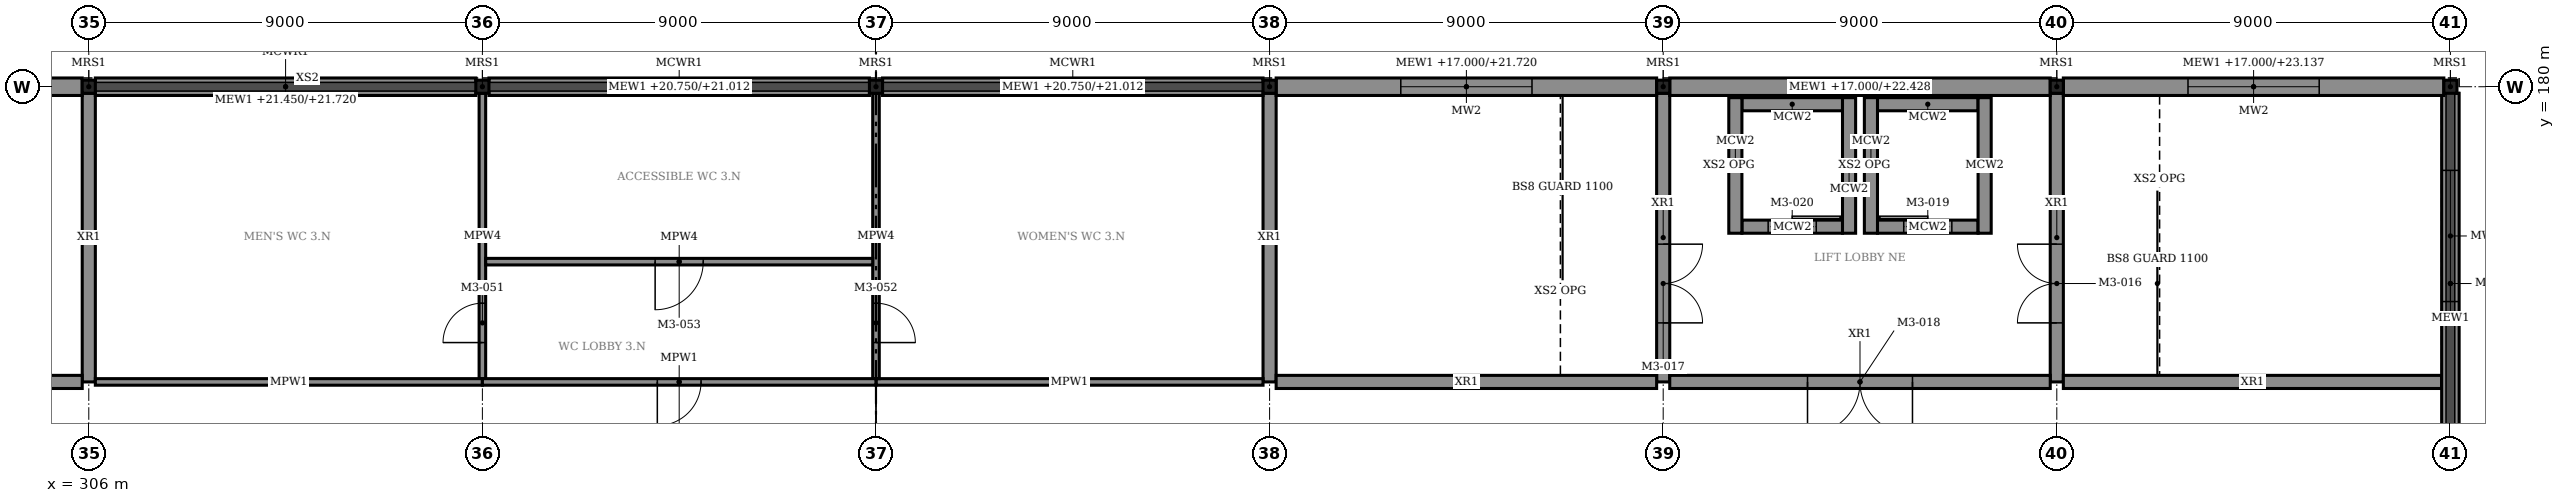
"""IFC4 building model, lengths in metres.
Left out: names, types, materials, properties, quantities, classifications, styles, units other than length and angle.
Written with IfcOpenShell. Run it as: python <this file> out.ifc"""

import sys

from ifc_helpers import new_model, si_unit, direction, frame, frame_2d, origin, origin_2d, place, context, subcontext, project, spatial, polyline, rectangle, hollow_rectangle, outline, extrude, element, fill, save


model = new_model("IFC4")
c1 = context("Model", 3, precision=1e-05, world=origin(), true_north=direction((0.0, 1.0)))
c2 = subcontext(c1, "Body", "Model", "MODEL_VIEW")
j1 = project(units=[si_unit("LENGTHUNIT", "METRE"), si_unit("PLANEANGLEUNIT", "RADIAN")], contexts=[c1])
p1 = place(None, origin())
s1 = spatial("IfcSite", under=j1, at=p1, CompositionType="ELEMENT")
p2 = place(p1, origin())
s2 = spatial("IfcBuilding", under=s1, at=p2, CompositionType="ELEMENT")
p3 = place(p2, frame((0.0, 0.0, 17.0)))
s3 = spatial("IfcBuildingStorey", under=s2, at=p3, CompositionType="ELEMENT", Elevation=17.0)
for number, where, z_axis, x_axis in (
    (1, (306.0, 180.0, 0.0), (0.0, 0.0, 1.0), (1.0, 0.0, 0.0)),
    (2, (315.0, 180.0, 0.0), (0.0, 0.0, 1.0), (1.0, 0.0, 0.0)),
    (3, (324.0, 180.0, 0.0), (0.0, 0.0, 1.0), (1.0, 0.0, 0.0)),
    (4, (333.0, 180.0, 0.0), (0.0, 0.0, 1.0), (1.0, 0.0, 0.0)),
    (5, (342.0, 180.0, 0.0), (0.0, 0.0, 1.0), (1.0, 0.0, 0.0)),
    (6, (351.0, 180.0, 0.0), (0.0, 0.0, 1.0), (1.0, 0.0, 0.0)),
    (7, (360.0, 180.0, 0.0), (0.0, 0.0, 1.0), (1.0, 0.0, 0.0)),
):
    element("IfcColumn", number, at=place(p3, frame(where, z_axis=z_axis, x_axis=x_axis)), inside=s3, PredefinedType="COLUMN", context=c2, shape_type="SweptSolid", body=[
        extrude(hollow_rectangle(XDim=0.3, YDim=0.3, WallThickness=0.012, InnerFilletRadius=0.024, OuterFilletRadius=0.036, at=origin_2d()), origin(), (0.0, 0.0, 1.0), 3.1),
    ])
p4 = place(p3, frame((297.15, 180.0, 0.0), z_axis=(0.0, 0.0, 1.0), x_axis=(1.0, 0.0, 0.0)))
e8 = element("IfcWall", 8, at=p4, inside=s3, PredefinedType="STANDARD", context=c2, shape_type="SweptSolid", body=[
    extrude(outline(polyline([(0.0, 0.0), (8.7, 0.0), (8.7, 5.428), (0.0, 6.113), (0.0, 0.0)])), frame((0.0, 0.2, 0.0), z_axis=(0.0, -1.0, 0.0), x_axis=(1.0, 0.0, 0.0)), (0.0, 0.0, 1.0), 0.4),
])
p5 = place(p4, frame((2.85, 0.0, 0.9)))
e9 = element("IfcOpeningElement", 9, at=p5, cuts=e8, PredefinedType="OPENING", context=c2, shape_type="SweptSolid", body=[
    extrude(rectangle(XDim=3.0, YDim=2.1, at=frame_2d((1.5, 1.05))), frame((0.0, 0.21, 0.0), z_axis=(0.0, -1.0, 0.0), x_axis=(1.0, 0.0, 0.0)), (0.0, 0.0, 1.0), 0.42),
])
p6 = place(p3, frame((306.15, 180.0, 4.45), z_axis=(0.0, 0.0, 1.0), x_axis=(1.0, 0.0, 0.0)))
e10 = element("IfcWall", 10, at=p6, inside=s3, PredefinedType="STANDARD", context=c2, shape_type="SweptSolid", body=[
    extrude(outline(polyline([(0.0, 0.0), (8.7, 0.0), (8.7, 0.27), (0.0, 0.955), (0.0, 0.0)])), frame((0.0, 0.2, 0.0), z_axis=(0.0, -1.0, 0.0), x_axis=(1.0, 0.0, 0.0)), (0.0, 0.0, 1.0), 0.4),
])
p7 = place(p3, frame((315.15, 180.0, 3.75), z_axis=(0.0, 0.0, 1.0), x_axis=(1.0, 0.0, 0.0)))
e11 = element("IfcWall", 11, at=p7, inside=s3, PredefinedType="STANDARD", context=c2, shape_type="SweptSolid", body=[
    extrude(outline(polyline([(0.0, 0.0), (8.7, 0.0), (8.7, 0.262), (0.0, 0.947), (0.0, 0.0)])), frame((0.0, 0.2, 0.0), z_axis=(0.0, -1.0, 0.0), x_axis=(1.0, 0.0, 0.0)), (0.0, 0.0, 1.0), 0.4),
])
p8 = place(p3, frame((324.15, 180.0, 3.75), z_axis=(0.0, 0.0, 1.0), x_axis=(1.0, 0.0, 0.0)))
e12 = element("IfcWall", 12, at=p8, inside=s3, PredefinedType="STANDARD", context=c2, shape_type="SweptSolid", body=[
    extrude(outline(polyline([(0.0, 0.0), (8.7, 0.0), (8.7, 0.947), (0.0, 0.262), (0.0, 0.0)])), frame((0.0, 0.2, 0.0), z_axis=(0.0, -1.0, 0.0), x_axis=(1.0, 0.0, 0.0)), (0.0, 0.0, 1.0), 0.4),
])
p9 = place(p3, frame((333.15, 180.0, 0.0), z_axis=(0.0, 0.0, 1.0), x_axis=(1.0, 0.0, 0.0)))
e13 = element("IfcWall", 13, at=p9, inside=s3, PredefinedType="STANDARD", context=c2, shape_type="SweptSolid", body=[
    extrude(outline(polyline([(0.0, 0.0), (8.7, 0.0), (8.7, 5.405), (0.0, 4.72), (0.0, 0.0)])), frame((0.0, 0.2, 0.0), z_axis=(0.0, -1.0, 0.0), x_axis=(1.0, 0.0, 0.0)), (0.0, 0.0, 1.0), 0.4),
])
p10 = place(p9, frame((2.85, 0.0, 0.9)))
e14 = element("IfcOpeningElement", 14, at=p10, cuts=e13, PredefinedType="OPENING", context=c2, shape_type="SweptSolid", body=[
    extrude(rectangle(XDim=3.0, YDim=2.1, at=frame_2d((1.5, 1.05))), frame((0.0, 0.21, 0.0), z_axis=(0.0, -1.0, 0.0), x_axis=(1.0, 0.0, 0.0)), (0.0, 0.0, 1.0), 0.42),
])
p11 = place(p3, frame((342.15, 180.0, 0.0), z_axis=(0.0, 0.0, 1.0), x_axis=(1.0, 0.0, 0.0)))
e15 = element("IfcWall", 15, at=p11, inside=s3, PredefinedType="STANDARD", context=c2, shape_type="SweptSolid", body=[
    extrude(outline(polyline([(0.0, 0.0), (8.7, 0.0), (8.7, 6.113), (0.0, 5.428), (0.0, 0.0)])), frame((0.0, 0.2, 0.0), z_axis=(0.0, -1.0, 0.0), x_axis=(1.0, 0.0, 0.0)), (0.0, 0.0, 1.0), 0.4),
])
p12 = place(p3, frame((351.15, 180.0, 0.0), z_axis=(0.0, 0.0, 1.0), x_axis=(1.0, 0.0, 0.0)))
e16 = element("IfcWall", 16, at=p12, inside=s3, PredefinedType="STANDARD", context=c2, shape_type="SweptSolid", body=[
    extrude(outline(polyline([(0.0, 0.0), (8.7, 0.0), (8.7, 6.822), (0.0, 6.137), (0.0, 0.0)])), frame((0.0, 0.2, 0.0), z_axis=(0.0, -1.0, 0.0), x_axis=(1.0, 0.0, 0.0)), (0.0, 0.0, 1.0), 0.4),
])
p13 = place(p12, frame((2.85, 0.0, 0.9)))
e17 = element("IfcOpeningElement", 17, at=p13, cuts=e16, PredefinedType="OPENING", context=c2, shape_type="SweptSolid", body=[
    extrude(rectangle(XDim=3.0, YDim=2.1, at=frame_2d((1.5, 1.05))), frame((0.0, 0.21, 0.0), z_axis=(0.0, -1.0, 0.0), x_axis=(1.0, 0.0, 0.0)), (0.0, 0.0, 1.0), 0.42),
])
p14 = place(p3, frame((360.0, 171.15, 0.0), z_axis=(0.0, 0.0, 1.0), x_axis=(0.0, 1.0, 0.0)))
e18 = element("IfcWall", 18, at=p14, inside=s3, PredefinedType="STANDARD", context=c2, shape_type="SweptSolid", body=[
    extrude(rectangle(XDim=8.7, YDim=0.4, at=frame_2d((4.35, 0.0))), origin(), (0.0, 0.0, 1.0), 3.3),
])
p15 = place(p14, frame((3.938, 0.0, 0.9)))
e19 = element("IfcOpeningElement", 19, at=p15, cuts=e18, PredefinedType="OPENING", context=c2, shape_type="SweptSolid", body=[
    extrude(rectangle(XDim=3.0, YDim=2.1, at=frame_2d((1.5, 1.05))), frame((0.0, 0.21, 0.0), z_axis=(0.0, -1.0, 0.0), x_axis=(1.0, 0.0, 0.0)), (0.0, 0.0, 1.0), 0.42),
])
p16 = place(p3, frame((306.0, 173.25, 0.0), z_axis=(0.0, 0.0, 1.0), x_axis=(0.0, 1.0, 0.0)))
e20 = element("IfcWall", 20, at=p16, inside=s3, PredefinedType="SHEAR", context=c2, shape_type="SweptSolid", body=[
    extrude(rectangle(XDim=6.6, YDim=0.3, at=frame_2d((3.3, 0.0))), origin(), (0.0, 0.0, 1.0), 3.0),
])
p17 = place(p3, frame((297.15, 173.25, 0.0), z_axis=(0.0, 0.0, 1.0), x_axis=(1.0, 0.0, 0.0)))
e21 = element("IfcWall", 21, at=p17, inside=s3, PredefinedType="SHEAR", context=c2, shape_type="SweptSolid", body=[
    extrude(rectangle(XDim=8.7, YDim=0.3, at=frame_2d((4.35, 0.0))), origin(), (0.0, 0.0, 1.0), 3.0),
])
p18 = place(p3, frame((351.0, 173.25, 0.0), z_axis=(0.0, 0.0, 1.0), x_axis=(0.0, 1.0, 0.0)))
e22 = element("IfcWall", 22, at=p18, inside=s3, PredefinedType="SHEAR", context=c2, shape_type="SweptSolid", body=[
    extrude(rectangle(XDim=6.6, YDim=0.3, at=frame_2d((3.3, 0.0))), origin(), (0.0, 0.0, 1.0), 3.0),
])
p19 = place(p18, frame((1.35, 0.0, 0.0)))
e23 = element("IfcOpeningElement", 23, at=p19, cuts=e22, PredefinedType="OPENING", context=c2, shape_type="SweptSolid", body=[
    extrude(rectangle(XDim=1.8, YDim=2.4, at=frame_2d((0.9, 1.2))), frame((0.0, 0.16, 0.0), z_axis=(0.0, -1.0, 0.0), x_axis=(1.0, 0.0, 0.0)), (0.0, 0.0, 1.0), 0.32),
])
p20 = place(p3, frame((342.0, 173.25, 0.0), z_axis=(0.0, 0.0, 1.0), x_axis=(0.0, 1.0, 0.0)))
e24 = element("IfcWall", 24, at=p20, inside=s3, PredefinedType="SHEAR", context=c2, shape_type="SweptSolid", body=[
    extrude(rectangle(XDim=6.6, YDim=0.3, at=frame_2d((3.3, 0.0))), origin(), (0.0, 0.0, 1.0), 3.0),
])
p21 = place(p20, frame((1.35, 0.0, 0.0)))
e25 = element("IfcOpeningElement", 25, at=p21, cuts=e24, PredefinedType="OPENING", context=c2, shape_type="SweptSolid", body=[
    extrude(rectangle(XDim=1.8, YDim=2.4, at=frame_2d((0.9, 1.2))), frame((0.0, 0.16, 0.0), z_axis=(0.0, -1.0, 0.0), x_axis=(1.0, 0.0, 0.0)), (0.0, 0.0, 1.0), 0.32),
])
p22 = place(p3, frame((333.0, 173.25, 0.0), z_axis=(0.0, 0.0, 1.0), x_axis=(0.0, 1.0, 0.0)))
e26 = element("IfcWall", 26, at=p22, inside=s3, PredefinedType="SHEAR", context=c2, shape_type="SweptSolid", body=[
    extrude(rectangle(XDim=6.6, YDim=0.3, at=frame_2d((3.3, 0.0))), origin(), (0.0, 0.0, 1.0), 3.0),
])
p23 = place(p3, frame((333.15, 173.25, 0.0), z_axis=(0.0, 0.0, 1.0), x_axis=(1.0, 0.0, 0.0)))
e27 = element("IfcWall", 27, at=p23, inside=s3, PredefinedType="SHEAR", context=c2, shape_type="SweptSolid", body=[
    extrude(rectangle(XDim=8.7, YDim=0.3, at=frame_2d((4.35, 0.0))), origin(), (0.0, 0.0, 1.0), 3.0),
])
p24 = place(p3, frame((342.15, 173.25, 0.0), z_axis=(0.0, 0.0, 1.0), x_axis=(1.0, 0.0, 0.0)))
e28 = element("IfcWall", 28, at=p24, inside=s3, PredefinedType="SHEAR", context=c2, shape_type="SweptSolid", body=[
    extrude(rectangle(XDim=8.7, YDim=0.3, at=frame_2d((4.35, 0.0))), origin(), (0.0, 0.0, 1.0), 3.0),
])
p25 = place(p24, frame((3.15, 0.0, 0.0)))
e29 = element("IfcOpeningElement", 29, at=p25, cuts=e28, PredefinedType="OPENING", context=c2, shape_type="SweptSolid", body=[
    extrude(rectangle(XDim=2.4, YDim=2.4, at=frame_2d((1.2, 1.2))), frame((0.0, 0.16, 0.0), z_axis=(0.0, -1.0, 0.0), x_axis=(1.0, 0.0, 0.0)), (0.0, 0.0, 1.0), 0.32),
])
p26 = place(p3, frame((351.15, 173.25, 0.0), z_axis=(0.0, 0.0, 1.0), x_axis=(1.0, 0.0, 0.0)))
e30 = element("IfcWall", 30, at=p26, inside=s3, PredefinedType="SHEAR", context=c2, shape_type="SweptSolid", body=[
    extrude(rectangle(XDim=8.65, YDim=0.3, at=frame_2d((4.325, 0.0))), origin(), (0.0, 0.0, 1.0), 3.0),
])
for number, where, z_axis, x_axis in (
    (31, (349.35, 176.65, 0.0), (0.0, 0.0, 1.0), (0.0, 1.0, 0.0)),
    (32, (346.75, 176.65, 0.0), (0.0, 0.0, 1.0), (0.0, 1.0, 0.0)),
):
    element("IfcWall", number, at=place(p3, frame(where, z_axis=z_axis, x_axis=x_axis)), inside=s3, PredefinedType="SHEAR", context=c2, shape_type="SweptSolid", body=[
        extrude(rectangle(XDim=3.1, YDim=0.3, at=frame_2d((1.55, 0.0))), origin(), (0.0, 0.0, 1.0), 3.0),
    ])
p27 = place(p3, frame((346.9, 179.6, 0.0), z_axis=(0.0, 0.0, 1.0), x_axis=(1.0, 0.0, 0.0)))
e33 = element("IfcWall", 33, at=p27, inside=s3, PredefinedType="SHEAR", context=c2, shape_type="SweptSolid", body=[
    extrude(rectangle(XDim=2.3, YDim=0.3, at=frame_2d((1.15, 0.0))), origin(), (0.0, 0.0, 1.0), 3.0),
])
p28 = place(p3, frame((346.9, 176.8, 0.0), z_axis=(0.0, 0.0, 1.0), x_axis=(1.0, 0.0, 0.0)))
e34 = element("IfcWall", 34, at=p28, inside=s3, PredefinedType="SHEAR", context=c2, shape_type="SweptSolid", body=[
    extrude(rectangle(XDim=2.3, YDim=0.3, at=frame_2d((1.15, 0.0))), origin(), (0.0, 0.0, 1.0), 3.0),
])
p29 = place(p28, frame((0.6, 0.0, 0.0)))
e35 = element("IfcOpeningElement", 35, at=p29, cuts=e34, PredefinedType="OPENING", context=c2, shape_type="SweptSolid", body=[
    extrude(rectangle(XDim=1.1, YDim=2.2, at=frame_2d((0.55, 1.1))), frame((0.0, 0.16, 0.0), z_axis=(0.0, -1.0, 0.0), x_axis=(1.0, 0.0, 0.0)), (0.0, 0.0, 1.0), 0.32),
])
for number, where, z_axis, x_axis in (
    (36, (346.25, 176.65, 0.0), (0.0, 0.0, 1.0), (0.0, 1.0, 0.0)),
    (37, (343.65, 176.65, 0.0), (0.0, 0.0, 1.0), (0.0, 1.0, 0.0)),
):
    element("IfcWall", number, at=place(p3, frame(where, z_axis=z_axis, x_axis=x_axis)), inside=s3, PredefinedType="SHEAR", context=c2, shape_type="SweptSolid", body=[
        extrude(rectangle(XDim=3.1, YDim=0.3, at=frame_2d((1.55, 0.0))), origin(), (0.0, 0.0, 1.0), 3.0),
    ])
p30 = place(p3, frame((343.8, 179.6, 0.0), z_axis=(0.0, 0.0, 1.0), x_axis=(1.0, 0.0, 0.0)))
e38 = element("IfcWall", 38, at=p30, inside=s3, PredefinedType="SHEAR", context=c2, shape_type="SweptSolid", body=[
    extrude(rectangle(XDim=2.3, YDim=0.3, at=frame_2d((1.15, 0.0))), origin(), (0.0, 0.0, 1.0), 3.0),
])
p31 = place(p3, frame((343.8, 176.8, 0.0), z_axis=(0.0, 0.0, 1.0), x_axis=(1.0, 0.0, 0.0)))
e39 = element("IfcWall", 39, at=p31, inside=s3, PredefinedType="SHEAR", context=c2, shape_type="SweptSolid", body=[
    extrude(rectangle(XDim=2.3, YDim=0.3, at=frame_2d((1.15, 0.0))), origin(), (0.0, 0.0, 1.0), 3.0),
])
p32 = place(p31, frame((0.6, 0.0, 0.0)))
e40 = element("IfcOpeningElement", 40, at=p32, cuts=e39, PredefinedType="OPENING", context=c2, shape_type="SweptSolid", body=[
    extrude(rectangle(XDim=1.1, YDim=2.2, at=frame_2d((0.55, 1.1))), frame((0.0, 0.16, 0.0), z_axis=(0.0, -1.0, 0.0), x_axis=(1.0, 0.0, 0.0)), (0.0, 0.0, 1.0), 0.32),
])
p33 = place(p3, frame((306.15, 173.25, 0.0), z_axis=(0.0, 0.0, 1.0), x_axis=(1.0, 0.0, 0.0)))
e41 = element("IfcWall", 41, at=p33, inside=s3, PredefinedType="PARTITIONING", context=c2, shape_type="SweptSolid", body=[
    extrude(rectangle(XDim=8.85, YDim=0.15, at=frame_2d((4.425, 0.0))), origin(), (0.0, 0.0, 1.0), 3.0),
])
p34 = place(p3, frame((315.0, 173.325, 0.0), z_axis=(0.0, 0.0, 1.0), x_axis=(0.0, 1.0, 0.0)))
e42 = element("IfcWall", 42, at=p34, inside=s3, PredefinedType="PARTITIONING", context=c2, shape_type="SweptSolid", body=[
    extrude(rectangle(XDim=6.525, YDim=0.15, at=frame_2d((3.263, 0.0))), origin(), (0.0, 0.0, 1.0), 3.0),
])
p35 = place(p34, frame((0.825, 0.0, 0.0)))
e43 = element("IfcOpeningElement", 43, at=p35, cuts=e42, PredefinedType="OPENING", context=c2, shape_type="SweptSolid", body=[
    extrude(rectangle(XDim=0.9, YDim=2.1, at=frame_2d((0.45, 1.05))), frame((0.0, 0.085, 0.0), z_axis=(0.0, -1.0, 0.0), x_axis=(1.0, 0.0, 0.0)), (0.0, 0.0, 1.0), 0.17),
])
p36 = place(p3, frame((324.0, 173.25, 0.0), z_axis=(0.0, 0.0, 1.0), x_axis=(1.0, 0.0, 0.0)))
e44 = element("IfcWall", 44, at=p36, inside=s3, PredefinedType="PARTITIONING", context=c2, shape_type="SweptSolid", body=[
    extrude(rectangle(XDim=8.85, YDim=0.15, at=frame_2d((4.425, 0.0))), origin(), (0.0, 0.0, 1.0), 3.0),
])
p37 = place(p3, frame((324.0, 173.325, 0.0), z_axis=(0.0, 0.0, 1.0), x_axis=(0.0, 1.0, 0.0)))
e45 = element("IfcWall", 45, at=p37, inside=s3, PredefinedType="PARTITIONING", context=c2, shape_type="SweptSolid", body=[
    extrude(rectangle(XDim=6.525, YDim=0.15, at=frame_2d((3.263, 0.0))), origin(), (0.0, 0.0, 1.0), 3.0),
])
p38 = place(p37, frame((0.825, 0.0, 0.0)))
e46 = element("IfcOpeningElement", 46, at=p38, cuts=e45, PredefinedType="OPENING", context=c2, shape_type="SweptSolid", body=[
    extrude(rectangle(XDim=0.9, YDim=2.1, at=frame_2d((0.45, 1.05))), frame((0.0, 0.085, 0.0), z_axis=(0.0, -1.0, 0.0), x_axis=(1.0, 0.0, 0.0)), (0.0, 0.0, 1.0), 0.17),
])
p39 = place(p3, frame((315.075, 176.0, 0.0), z_axis=(0.0, 0.0, 1.0), x_axis=(1.0, 0.0, 0.0)))
e47 = element("IfcWall", 47, at=p39, inside=s3, PredefinedType="PARTITIONING", context=c2, shape_type="SweptSolid", body=[
    extrude(rectangle(XDim=8.85, YDim=0.15, at=frame_2d((4.425, 0.0))), origin(), (0.0, 0.0, 1.0), 3.0),
])
p40 = place(p39, frame((3.875, 0.0, 0.0)))
e48 = element("IfcOpeningElement", 48, at=p40, cuts=e47, PredefinedType="OPENING", context=c2, shape_type="SweptSolid", body=[
    extrude(rectangle(XDim=1.1, YDim=2.1, at=frame_2d((0.55, 1.05))), frame((0.0, 0.085, 0.0), z_axis=(0.0, -1.0, 0.0), x_axis=(1.0, 0.0, 0.0)), (0.0, 0.0, 1.0), 0.17),
])
p41 = place(p3, frame((315.0, 173.25, 0.0), z_axis=(0.0, 0.0, 1.0), x_axis=(1.0, 0.0, 0.0)))
e49 = element("IfcWall", 49, at=p41, inside=s3, PredefinedType="PARTITIONING", context=c2, shape_type="SweptSolid", body=[
    extrude(rectangle(XDim=9.0, YDim=0.15, at=frame_2d((4.5, 0.0))), origin(), (0.0, 0.0, 1.0), 3.0),
])
p42 = place(p41, frame((4.0, 0.0, 0.0)))
e50 = element("IfcOpeningElement", 50, at=p42, cuts=e49, PredefinedType="OPENING", context=c2, shape_type="SweptSolid", body=[
    extrude(rectangle(XDim=1.0, YDim=2.4, at=frame_2d((0.5, 1.2))), frame((0.0, 0.085, 0.0), z_axis=(0.0, -1.0, 0.0), x_axis=(1.0, 0.0, 0.0)), (0.0, 0.0, 1.0), 0.17),
])
p43 = place(p10, origin())
e51 = element("IfcWindow", 51, at=p43, inside=s3, PartitioningType="TRIPLE_PANEL_VERTICAL", PredefinedType="WINDOW", context=c2, shape_type="SweptSolid", body=[
    extrude(rectangle(XDim=3.0, YDim=2.1, at=frame_2d((1.5, 1.05))), frame((0.0, 0.03, 0.0), z_axis=(0.0, -1.0, 0.0), x_axis=(1.0, 0.0, 0.0)), (0.0, 0.0, 1.0), 0.06),
])
fill(e14, e51)
p44 = place(p13, origin())
e52 = element("IfcWindow", 52, at=p44, inside=s3, PartitioningType="TRIPLE_PANEL_VERTICAL", PredefinedType="WINDOW", context=c2, shape_type="SweptSolid", body=[
    extrude(rectangle(XDim=3.0, YDim=2.1, at=frame_2d((1.5, 1.05))), frame((0.0, 0.03, 0.0), z_axis=(0.0, -1.0, 0.0), x_axis=(1.0, 0.0, 0.0)), (0.0, 0.0, 1.0), 0.06),
])
fill(e17, e52)
p45 = place(p15, origin())
e53 = element("IfcWindow", 53, at=p45, inside=s3, PartitioningType="TRIPLE_PANEL_VERTICAL", PredefinedType="WINDOW", context=c2, shape_type="SweptSolid", body=[
    extrude(rectangle(XDim=3.0, YDim=2.1, at=frame_2d((1.5, 1.05))), frame((0.0, 0.03, 0.0), z_axis=(0.0, -1.0, 0.0), x_axis=(1.0, 0.0, 0.0)), (0.0, 0.0, 1.0), 0.06),
])
fill(e19, e53)
p46 = place(p19, origin())
e54 = element("IfcDoor", 54, at=p46, inside=s3, OperationType="DOUBLE_DOOR_SINGLE_SWING", PredefinedType="DOOR", context=c2, shape_type="SweptSolid", body=[
    extrude(rectangle(XDim=1.8, YDim=2.4, at=frame_2d((0.9, 1.2))), frame((0.0, 0.025, 0.0), z_axis=(0.0, -1.0, 0.0), x_axis=(1.0, 0.0, 0.0)), (0.0, 0.0, 1.0), 0.05),
])
fill(e23, e54)
p47 = place(p21, frame((1.8, 0.0, 0.0), z_axis=(0.0, 0.0, 1.0), x_axis=(-1.0, 0.0, 0.0)))
e55 = element("IfcDoor", 55, at=p47, inside=s3, OperationType="DOUBLE_DOOR_SINGLE_SWING", PredefinedType="DOOR", context=c2, shape_type="SweptSolid", body=[
    extrude(rectangle(XDim=1.8, YDim=2.4, at=frame_2d((0.9, 1.2))), frame((0.0, 0.025, 0.0), z_axis=(0.0, -1.0, 0.0), x_axis=(1.0, 0.0, 0.0)), (0.0, 0.0, 1.0), 0.05),
])
fill(e25, e55)
p48 = place(p25, frame((2.4, 0.0, 0.0), z_axis=(0.0, 0.0, 1.0), x_axis=(-1.0, 0.0, 0.0)))
e56 = element("IfcDoor", 56, at=p48, inside=s3, OperationType="DOUBLE_DOOR_SINGLE_SWING", PredefinedType="DOOR", context=c2, shape_type="SweptSolid", body=[
    extrude(rectangle(XDim=2.4, YDim=2.4, at=frame_2d((1.2, 1.2))), frame((0.0, 0.025, 0.0), z_axis=(0.0, -1.0, 0.0), x_axis=(1.0, 0.0, 0.0)), (0.0, 0.0, 1.0), 0.05),
])
fill(e29, e56)
p49 = place(p29, origin())
e57 = element("IfcDoor", 57, at=p49, inside=s3, OperationType="SLIDING_TO_LEFT", PredefinedType="DOOR", context=c2, shape_type="SweptSolid", body=[
    extrude(rectangle(XDim=1.1, YDim=2.2, at=frame_2d((0.55, 1.1))), frame((0.0, 0.025, 0.0), z_axis=(0.0, -1.0, 0.0), x_axis=(1.0, 0.0, 0.0)), (0.0, 0.0, 1.0), 0.05),
])
fill(e35, e57)
p50 = place(p32, origin())
e58 = element("IfcDoor", 58, at=p50, inside=s3, OperationType="SLIDING_TO_RIGHT", PredefinedType="DOOR", context=c2, shape_type="SweptSolid", body=[
    extrude(rectangle(XDim=1.1, YDim=2.2, at=frame_2d((0.55, 1.1))), frame((0.0, 0.025, 0.0), z_axis=(0.0, -1.0, 0.0), x_axis=(1.0, 0.0, 0.0)), (0.0, 0.0, 1.0), 0.05),
])
fill(e40, e58)
p51 = place(p35, origin())
e59 = element("IfcDoor", 59, at=p51, inside=s3, OperationType="SINGLE_SWING_LEFT", PredefinedType="DOOR", context=c2, shape_type="SweptSolid", body=[
    extrude(rectangle(XDim=0.9, YDim=2.1, at=frame_2d((0.45, 1.05))), frame((0.0, 0.025, 0.0), z_axis=(0.0, -1.0, 0.0), x_axis=(1.0, 0.0, 0.0)), (0.0, 0.0, 1.0), 0.05),
])
fill(e43, e59)
p52 = place(p38, frame((0.9, 0.0, 0.0), z_axis=(0.0, 0.0, 1.0), x_axis=(-1.0, 0.0, 0.0)))
e60 = element("IfcDoor", 60, at=p52, inside=s3, OperationType="SINGLE_SWING_LEFT", PredefinedType="DOOR", context=c2, shape_type="SweptSolid", body=[
    extrude(rectangle(XDim=0.9, YDim=2.1, at=frame_2d((0.45, 1.05))), frame((0.0, 0.025, 0.0), z_axis=(0.0, -1.0, 0.0), x_axis=(1.0, 0.0, 0.0)), (0.0, 0.0, 1.0), 0.05),
])
fill(e46, e60)
p53 = place(p40, frame((1.1, 0.0, 0.0), z_axis=(0.0, 0.0, 1.0), x_axis=(-1.0, 0.0, 0.0)))
e61 = element("IfcDoor", 61, at=p53, inside=s3, OperationType="SINGLE_SWING_LEFT", PredefinedType="DOOR", context=c2, shape_type="SweptSolid", body=[
    extrude(rectangle(XDim=1.1, YDim=2.1, at=frame_2d((0.55, 1.05))), frame((0.0, 0.025, 0.0), z_axis=(0.0, -1.0, 0.0), x_axis=(1.0, 0.0, 0.0)), (0.0, 0.0, 1.0), 0.05),
])
fill(e48, e61)
p54 = place(p42, frame((1.0, 0.0, 0.0), z_axis=(0.0, 0.0, 1.0), x_axis=(-1.0, 0.0, 0.0)))
e62 = element("IfcDoor", 62, at=p54, inside=s3, OperationType="SINGLE_SWING_LEFT", PredefinedType="DOOR", context=c2, shape_type="SweptSolid", body=[
    extrude(rectangle(XDim=1.0, YDim=2.4, at=frame_2d((0.5, 1.2))), frame((0.0, 0.025, 0.0), z_axis=(0.0, -1.0, 0.0), x_axis=(1.0, 0.0, 0.0)), (0.0, 0.0, 1.0), 0.05),
])
fill(e50, e62)
save(model, sys.argv[1])
